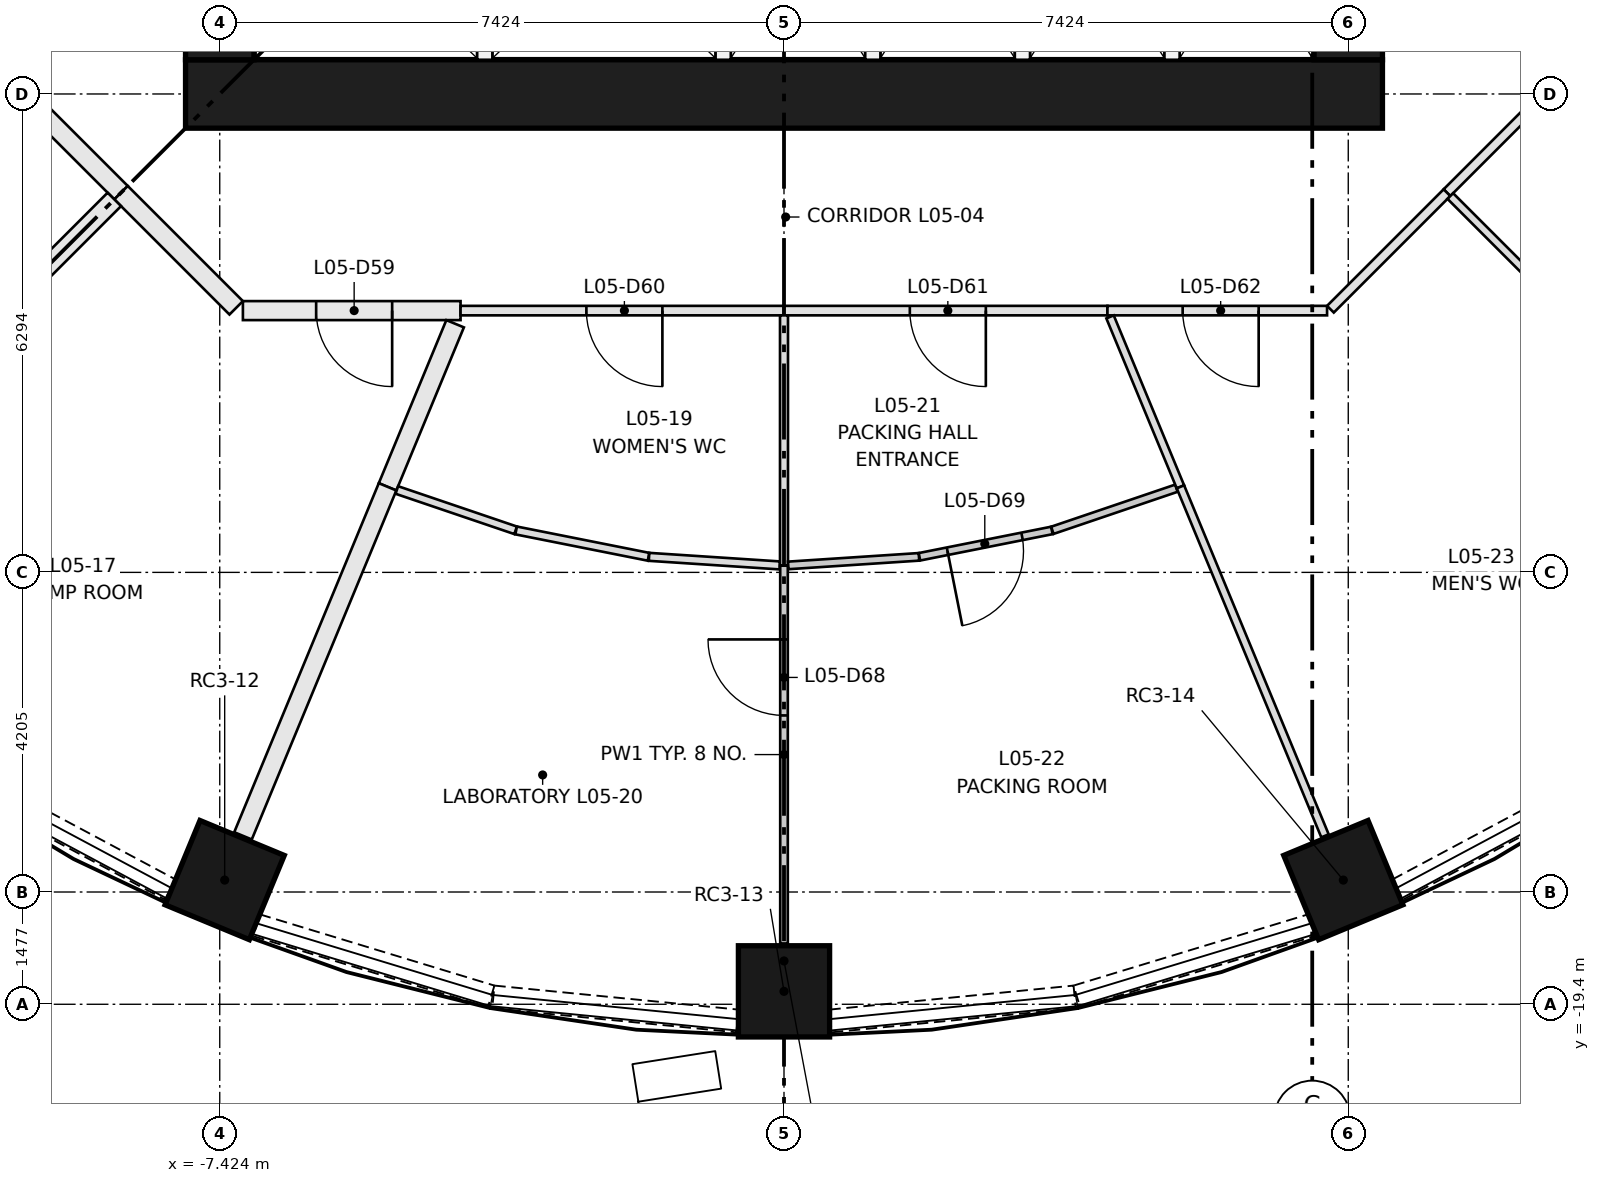
"""IFC4 building model, lengths in metres.
Left out: names, types, materials, properties, quantities, classifications, styles, units other than length and angle.
Written with IfcOpenShell. Run it as: python <this file> out.ifc"""

import sys

from ifc_helpers import new_model, si_unit, direction, frame, frame_2d, origin, origin_2d, place, context, subcontext, project, spatial, rectangle, extrude, element, fill, save


model = new_model("IFC4")
c1 = context("Model", 3, precision=1e-05, world=origin(), true_north=direction((0.0, 1.0)))
c2 = subcontext(c1, "Body", "Model", "MODEL_VIEW")
j1 = project(units=[si_unit("LENGTHUNIT", "METRE"), si_unit("PLANEANGLEUNIT", "RADIAN")], contexts=[c1])
p1 = place(None, origin())
s1 = spatial("IfcSite", under=j1, at=p1, CompositionType="ELEMENT")
p2 = place(p1, origin())
s2 = spatial("IfcBuilding", under=s1, at=p2, CompositionType="ELEMENT")
p3 = place(p2, frame((0.0, 0.0, 22.4)))
s3 = spatial("IfcBuildingStorey", under=s2, at=p3, CompositionType="ELEMENT", Elevation=22.4)
for number, where, z_axis, x_axis in (
    (1, (-7.359, -17.766, 0.0), (0.0, 0.0, 1.0), (-0.383, -0.924, 0.0)),
    (2, (0.0, -19.23, 0.0), (0.0, 0.0, 1.0), (0.0, -1.0, 0.0)),
    (3, (7.359, -17.766, 0.0), (0.0, 0.0, 1.0), (0.383, -0.924, 0.0)),
):
    element("IfcColumn", number, at=place(p3, frame(where, z_axis=z_axis, x_axis=x_axis)), inside=s3, PredefinedType="COLUMN", context=c2, shape_type="SweptSolid", body=[
        extrude(rectangle(XDim=1.2, YDim=1.2, at=origin_2d()), origin(), (0.0, 0.0, 1.0), 3.8),
    ])
p4 = place(p3, frame((-7.874, -7.424, 0.0), z_axis=(0.0, 0.0, 1.0), x_axis=(1.0, 0.0, 0.0)))
e4 = element("IfcWall", 4, at=p4, inside=s3, PredefinedType="SHEAR", context=c2, shape_type="SweptSolid", body=[
    extrude(rectangle(XDim=15.748, YDim=0.9, at=frame_2d((7.874, 0.0))), origin(), (0.0, 0.0, 1.0), 3.8),
])
p5 = place(p3, frame((-7.424, -6.974, 0.0), z_axis=(0.0, 0.0, 1.0), x_axis=(0.0, 1.0, 0.0)))
e5 = element("IfcWall", 5, at=p5, inside=s3, PredefinedType="SHEAR", context=c2, shape_type="SweptSolid", body=[
    extrude(rectangle(XDim=13.948, YDim=0.9, at=frame_2d((6.974, 0.0))), origin(), (0.0, 0.0, 1.0), 3.8),
])
p6 = place(p5, frame((6.474, 0.0, 0.0)))
e6 = element("IfcOpeningElement", 6, at=p6, cuts=e5, PredefinedType="OPENING", context=c2, shape_type="SweptSolid", body=[
    extrude(rectangle(XDim=1.0, YDim=2.1, at=frame_2d((0.5, 1.05))), frame((0.0, 0.46, 0.0), z_axis=(0.0, -1.0, 0.0), x_axis=(1.0, 0.0, 0.0)), (0.0, 0.0, 1.0), 0.92),
])
p7 = place(p5, frame((3.35, 0.0, 0.0)))
e7 = element("IfcOpeningElement", 7, at=p7, cuts=e5, PredefinedType="OPENING", context=c2, shape_type="SweptSolid", body=[
    extrude(rectangle(XDim=1.8, YDim=2.1, at=frame_2d((0.9, 1.05))), frame((0.0, 0.46, 0.0), z_axis=(0.0, -1.0, 0.0), x_axis=(1.0, 0.0, 0.0)), (0.0, 0.0, 1.0), 0.92),
])
p8 = place(p5, frame((8.799, 0.0, 0.0)))
e8 = element("IfcOpeningElement", 8, at=p8, cuts=e5, PredefinedType="OPENING", context=c2, shape_type="SweptSolid", body=[
    extrude(rectangle(XDim=1.8, YDim=2.1, at=frame_2d((0.9, 1.05))), frame((0.0, 0.46, 0.0), z_axis=(0.0, -1.0, 0.0), x_axis=(1.0, 0.0, 0.0)), (0.0, 0.0, 1.0), 0.92),
])
p9 = place(p5, frame((11.974, 0.0, 0.0)))
e9 = element("IfcOpeningElement", 9, at=p9, cuts=e5, PredefinedType="OPENING", context=c2, shape_type="SweptSolid", body=[
    extrude(rectangle(XDim=1.0, YDim=2.1, at=frame_2d((0.5, 1.05))), frame((0.0, 0.46, 0.0), z_axis=(0.0, -1.0, 0.0), x_axis=(1.0, 0.0, 0.0)), (0.0, 0.0, 1.0), 0.92),
])
p10 = place(p3, frame((7.424, -6.974, 0.0), z_axis=(0.0, 0.0, 1.0), x_axis=(0.0, 1.0, 0.0)))
e10 = element("IfcWall", 10, at=p10, inside=s3, PredefinedType="SHEAR", context=c2, shape_type="SweptSolid", body=[
    extrude(rectangle(XDim=13.948, YDim=0.9, at=frame_2d((6.974, 0.0))), origin(), (0.0, 0.0, 1.0), 3.8),
])
p11 = place(p10, frame((6.474, 0.0, 0.0)))
e11 = element("IfcOpeningElement", 11, at=p11, cuts=e10, PredefinedType="OPENING", context=c2, shape_type="SweptSolid", body=[
    extrude(rectangle(XDim=1.0, YDim=2.1, at=frame_2d((0.5, 1.05))), frame((0.0, 0.46, 0.0), z_axis=(0.0, -1.0, 0.0), x_axis=(1.0, 0.0, 0.0)), (0.0, 0.0, 1.0), 0.92),
])
p12 = place(p10, frame((3.35, 0.0, 0.0)))
e12 = element("IfcOpeningElement", 12, at=p12, cuts=e10, PredefinedType="OPENING", context=c2, shape_type="SweptSolid", body=[
    extrude(rectangle(XDim=1.8, YDim=2.1, at=frame_2d((0.9, 1.05))), frame((0.0, 0.46, 0.0), z_axis=(0.0, -1.0, 0.0), x_axis=(1.0, 0.0, 0.0)), (0.0, 0.0, 1.0), 0.92),
])
p13 = place(p10, frame((8.799, 0.0, 0.0)))
e13 = element("IfcOpeningElement", 13, at=p13, cuts=e10, PredefinedType="OPENING", context=c2, shape_type="SweptSolid", body=[
    extrude(rectangle(XDim=1.8, YDim=2.1, at=frame_2d((0.9, 1.05))), frame((0.0, 0.46, 0.0), z_axis=(0.0, -1.0, 0.0), x_axis=(1.0, 0.0, 0.0)), (0.0, 0.0, 1.0), 0.92),
])
for number, where, z_axis, x_axis in (
    (14, (-3.937, -6.974, 0.0), (0.0, 0.0, 1.0), (0.0, 1.0, 0.0)),
    (15, (-0.8, -6.974, 0.0), (0.0, 0.0, 1.0), (0.0, 1.0, 0.0)),
    (16, (1.168, -6.974, 0.0), (0.0, 0.0, 1.0), (0.0, 1.0, 0.0)),
    (17, (3.137, -6.974, 0.0), (0.0, 0.0, 1.0), (0.0, 1.0, 0.0)),
    (18, (5.105, -6.974, 0.0), (0.0, 0.0, 1.0), (0.0, 1.0, 0.0)),
):
    element("IfcWall", number, at=place(p3, frame(where, z_axis=z_axis, x_axis=x_axis)), inside=s3, PredefinedType="PARTITIONING", context=c2, shape_type="SweptSolid", body=[
        extrude(rectangle(XDim=2.8, YDim=0.2, at=frame_2d((1.4, 0.0))), origin(), (0.0, 0.0, 1.0), 3.45),
    ])
p14 = place(p3, frame((-10.92, -16.37, 0.0), z_axis=(0.0, 0.0, 1.0), x_axis=(0.881960953585, -0.471322475968, 0.0)))
e19 = element("IfcWall", 19, at=p14, inside=s3, PredefinedType="SOLIDWALL", context=c2, shape_type="SweptSolid", body=[
    extrude(rectangle(XDim=3.227, YDim=0.3, at=frame_2d((1.613, 0.0))), origin(), (0.0, 0.0, 1.0), 0.9),
])
p15 = place(p3, frame((-6.941, -18.36, 0.0), z_axis=(0.0, 0.0, 1.0), x_axis=(0.95687343998, -0.290505111592, 0.0)))
e20 = element("IfcWall", 20, at=p15, inside=s3, PredefinedType="SOLIDWALL", context=c2, shape_type="SweptSolid", body=[
    extrude(rectangle(XDim=3.226, YDim=0.3, at=frame_2d((1.613, 0.0))), origin(), (0.0, 0.0, 1.0), 0.9),
])
for number, where, z_axis, x_axis in (
    (21, (-3.824, -19.303, 0.0), (0.0, 0.0, 1.0), (0.995, -0.098, 0.0)),
    (22, (0.613, -19.619, 0.0), (0.0, 0.0, 1.0), (0.995, 0.098, 0.0)),
):
    element("IfcWall", number, at=place(p3, frame(where, z_axis=z_axis, x_axis=x_axis)), inside=s3, PredefinedType="SOLIDWALL", context=c2, shape_type="SweptSolid", body=[
        extrude(rectangle(XDim=3.227, YDim=0.3, at=frame_2d((1.613, 0.0))), origin(), (0.0, 0.0, 1.0), 0.9),
    ])
p16 = place(p3, frame((3.854, -19.298, 0.0), z_axis=(0.0, 0.0, 1.0), x_axis=(0.95687343998, 0.290505111592, 0.0)))
e23 = element("IfcWall", 23, at=p16, inside=s3, PredefinedType="SOLIDWALL", context=c2, shape_type="SweptSolid", body=[
    extrude(rectangle(XDim=3.226, YDim=0.3, at=frame_2d((1.613, 0.0))), origin(), (0.0, 0.0, 1.0), 0.9),
])
p17 = place(p3, frame((8.074, -17.891, 0.0), z_axis=(0.0, 0.0, 1.0), x_axis=(0.881960953585, 0.471322475968, 0.0)))
e24 = element("IfcWall", 24, at=p17, inside=s3, PredefinedType="SOLIDWALL", context=c2, shape_type="SweptSolid", body=[
    extrude(rectangle(XDim=3.227, YDim=0.3, at=frame_2d((1.613, 0.0))), origin(), (0.0, 0.0, 1.0), 0.9),
])
p18 = place(p3, frame((10.256, -7.189, 0.0), z_axis=(0.0, 0.0, 1.0), x_axis=(-0.707163081738, -0.707050476152, 0.0)))
e25 = element("IfcWall", 25, at=p18, inside=s3, PredefinedType="PARTITIONING", context=c2, shape_type="SweptSolid", body=[
    extrude(rectangle(XDim=2.168, YDim=0.125, at=frame_2d((1.084, 0.0))), origin(), (0.0, 0.0, 1.0), 3.45),
])
for number, where, z_axis, x_axis in (
    (26, (-8.722, -8.722, 0.0), (0.0, 0.0, 1.0), (-0.707, 0.707, 0.0)),
    (27, (-7.208, -10.237, 0.0), (0.0, 0.0, 1.0), (-0.707, 0.707, 0.0)),
):
    element("IfcWall", number, at=place(p3, frame(where, z_axis=z_axis, x_axis=x_axis)), inside=s3, PredefinedType="PARTITIONING", context=c2, shape_type="SweptSolid", body=[
        extrude(rectangle(XDim=2.142, YDim=0.25, at=frame_2d((1.071, 0.0))), origin(), (0.0, 0.0, 1.0), 3.45),
    ])
p19 = place(p3, frame((-4.256, -10.274, 0.0), z_axis=(0.0, 0.0, 1.0), x_axis=(-1.0, 0.0, 0.0)))
e28 = element("IfcWall", 28, at=p19, inside=s3, PredefinedType="PARTITIONING", context=c2, shape_type="SweptSolid", body=[
    extrude(rectangle(XDim=2.864, YDim=0.25, at=frame_2d((1.432, 0.0))), origin(), (0.0, 0.0, 1.0), 3.45),
])
p20 = place(p19, frame((0.9, 0.0, 0.0)))
e29 = element("IfcOpeningElement", 29, at=p20, cuts=e28, PredefinedType="OPENING", context=c2, shape_type="SweptSolid", body=[
    extrude(rectangle(XDim=1.0, YDim=2.1, at=frame_2d((0.5, 1.05))), frame((0.0, 0.135, 0.0), z_axis=(0.0, -1.0, 0.0), x_axis=(1.0, 0.0, 0.0)), (0.0, 0.0, 1.0), 0.27),
])
p21 = place(p3, frame((0.0, -10.274, 0.0), z_axis=(0.0, 0.0, 1.0), x_axis=(-1.0, 0.0, 0.0)))
e30 = element("IfcWall", 30, at=p21, inside=s3, PredefinedType="PARTITIONING", context=c2, shape_type="SweptSolid", body=[
    extrude(rectangle(XDim=4.256, YDim=0.125, at=frame_2d((2.128, 0.0))), origin(), (0.0, 0.0, 1.0), 3.45),
])
p22 = place(p21, frame((1.6, 0.0, 0.0)))
e31 = element("IfcOpeningElement", 31, at=p22, cuts=e30, PredefinedType="OPENING", context=c2, shape_type="SweptSolid", body=[
    extrude(rectangle(XDim=1.0, YDim=2.1, at=frame_2d((0.5, 1.05))), frame((0.0, 0.073, 0.0), z_axis=(0.0, -1.0, 0.0), x_axis=(1.0, 0.0, 0.0)), (0.0, 0.0, 1.0), 0.145),
])
p23 = place(p3, frame((4.256, -10.274, 0.0), z_axis=(0.0, 0.0, 1.0), x_axis=(-1.0, 0.0, 0.0)))
e32 = element("IfcWall", 32, at=p23, inside=s3, PredefinedType="PARTITIONING", context=c2, shape_type="SweptSolid", body=[
    extrude(rectangle(XDim=4.256, YDim=0.125, at=frame_2d((2.128, 0.0))), origin(), (0.0, 0.0, 1.0), 3.45),
])
p24 = place(p23, frame((1.6, 0.0, 0.0)))
e33 = element("IfcOpeningElement", 33, at=p24, cuts=e32, PredefinedType="OPENING", context=c2, shape_type="SweptSolid", body=[
    extrude(rectangle(XDim=1.0, YDim=2.1, at=frame_2d((0.5, 1.05))), frame((0.0, 0.073, 0.0), z_axis=(0.0, -1.0, 0.0), x_axis=(1.0, 0.0, 0.0)), (0.0, 0.0, 1.0), 0.145),
])
p25 = place(p3, frame((7.145, -10.274, 0.0), z_axis=(0.0, 0.0, 1.0), x_axis=(-1.0, 0.0, 0.0)))
e34 = element("IfcWall", 34, at=p25, inside=s3, PredefinedType="PARTITIONING", context=c2, shape_type="SweptSolid", body=[
    extrude(rectangle(XDim=2.89, YDim=0.125, at=frame_2d((1.445, 0.0))), origin(), (0.0, 0.0, 1.0), 3.45),
])
p26 = place(p25, frame((0.9, 0.0, 0.0)))
e35 = element("IfcOpeningElement", 35, at=p26, cuts=e34, PredefinedType="OPENING", context=c2, shape_type="SweptSolid", body=[
    extrude(rectangle(XDim=1.0, YDim=2.1, at=frame_2d((0.5, 1.05))), frame((0.0, 0.073, 0.0), z_axis=(0.0, -1.0, 0.0), x_axis=(1.0, 0.0, 0.0)), (0.0, 0.0, 1.0), 0.145),
])
p27 = place(p3, frame((8.722, -8.722, 0.0), z_axis=(0.0, 0.0, 1.0), x_axis=(-0.707050476152, -0.707163081738, 0.0)))
e36 = element("IfcWall", 36, at=p27, inside=s3, PredefinedType="PARTITIONING", context=c2, shape_type="SweptSolid", body=[
    extrude(rectangle(XDim=2.168, YDim=0.125, at=frame_2d((1.084, 0.0))), origin(), (0.0, 0.0, 1.0), 3.45),
])
p28 = place(p3, frame((-13.152, -13.152, 0.0), z_axis=(0.0, 0.0, 1.0), x_axis=(0.707106781187, 0.707106781187, 0.0)))
e37 = element("IfcWall", 37, at=p28, inside=s3, PredefinedType="PARTITIONING", context=c2, shape_type="SweptSolid", body=[
    extrude(rectangle(XDim=6.14, YDim=0.25, at=frame_2d((3.07, 0.0))), origin(), (0.0, 0.0, 1.0), 3.45),
])
p29 = place(p3, frame((-4.327, -10.447, 0.0), z_axis=(0.0, 0.0, 1.0), x_axis=(-0.382636505481, -0.923898968867, 0.0)))
e38 = element("IfcWall", 38, at=p29, inside=s3, PredefinedType="PARTITIONING", context=c2, shape_type="SweptSolid", body=[
    extrude(rectangle(XDim=2.323, YDim=0.25, at=frame_2d((1.161, 0.0))), origin(), (0.0, 0.0, 1.0), 3.45),
])
p30 = place(p3, frame((-5.216, -12.593, 0.0), z_axis=(0.0, 0.0, 1.0), x_axis=(-0.382720561955, -0.923864152058, 0.0)))
e39 = element("IfcWall", 39, at=p30, inside=s3, PredefinedType="PARTITIONING", context=c2, shape_type="SweptSolid", body=[
    extrude(rectangle(XDim=4.97, YDim=0.25, at=frame_2d((2.485, 0.0))), origin(), (0.0, 0.0, 1.0), 3.45),
])
p31 = place(p3, frame((-3.531, -13.165, 0.0), z_axis=(0.0, 0.0, 1.0), x_axis=(-0.946893484748, 0.321547397039, 0.0)))
e40 = element("IfcWall", 40, at=p31, inside=s3, PredefinedType="PARTITIONING", context=c2, shape_type="SweptSolid", body=[
    extrude(rectangle(XDim=1.651, YDim=0.105, at=frame_2d((0.825, 0.0))), origin(), (0.0, 0.0, 1.0), 3.45),
])
p32 = place(p3, frame((-1.782, -13.513, 0.0), z_axis=(0.0, 0.0, 1.0), x_axis=(-0.980791585618, 0.195058620882, 0.0)))
e41 = element("IfcWall", 41, at=p32, inside=s3, PredefinedType="PARTITIONING", context=c2, shape_type="SweptSolid", body=[
    extrude(rectangle(XDim=1.776, YDim=0.105, at=frame_2d((0.888, 0.0))), origin(), (0.0, 0.0, 1.0), 3.45),
])
p33 = place(p3, frame((-0.056, -13.626, 0.0), z_axis=(0.0, 0.0, 1.0), x_axis=(-0.997865280678, 0.065306061101, 0.0)))
e42 = element("IfcWall", 42, at=p33, inside=s3, PredefinedType="PARTITIONING", context=c2, shape_type="SweptSolid", body=[
    extrude(rectangle(XDim=1.723, YDim=0.105, at=frame_2d((0.862, 0.0))), origin(), (0.0, 0.0, 1.0), 3.45),
])
p34 = place(p3, frame((0.0, -10.336, 0.0), z_axis=(0.0, 0.0, 1.0), x_axis=(0.0, -1.0, 0.0)))
e43 = element("IfcWall", 43, at=p34, inside=s3, PredefinedType="PARTITIONING", context=c2, shape_type="SweptSolid", body=[
    extrude(rectangle(XDim=3.293, YDim=0.105, at=frame_2d((1.647, 0.0))), origin(), (0.0, 0.0, 1.0), 3.45),
])
p35 = place(p3, frame((0.0, -18.6, 0.0), z_axis=(0.0, 0.0, 1.0), x_axis=(0.0, 1.0, 0.0)))
e44 = element("IfcWall", 44, at=p35, inside=s3, PredefinedType="PARTITIONING", context=c2, shape_type="SweptSolid", body=[
    extrude(rectangle(XDim=4.97, YDim=0.1, at=frame_2d((2.485, 0.0))), origin(), (0.0, 0.0, 1.0), 3.45),
])
p36 = place(p35, frame((3.0, 0.0, 0.0)))
e45 = element("IfcOpeningElement", 45, at=p36, cuts=e44, PredefinedType="OPENING", context=c2, shape_type="SweptSolid", body=[
    extrude(rectangle(XDim=1.0, YDim=2.1, at=frame_2d((0.5, 1.05))), frame((0.0, 0.06, 0.0), z_axis=(0.0, -1.0, 0.0), x_axis=(1.0, 0.0, 0.0)), (0.0, 0.0, 1.0), 0.12),
])
p37 = place(p3, frame((1.776, -13.514, 0.0), z_axis=(0.0, 0.0, 1.0), x_axis=(-0.997865884721, -0.065296830782, 0.0)))
e46 = element("IfcWall", 46, at=p37, inside=s3, PredefinedType="PARTITIONING", context=c2, shape_type="SweptSolid", body=[
    extrude(rectangle(XDim=1.724, YDim=0.1, at=frame_2d((0.862, 0.0))), origin(), (0.0, 0.0, 1.0), 3.45),
])
p38 = place(p3, frame((3.524, -13.166, 0.0), z_axis=(0.0, 0.0, 1.0), x_axis=(-0.980796814698, -0.195032326241, 0.0)))
e47 = element("IfcWall", 47, at=p38, inside=s3, PredefinedType="PARTITIONING", context=c2, shape_type="SweptSolid", body=[
    extrude(rectangle(XDim=1.776, YDim=0.1, at=frame_2d((0.888, 0.0))), origin(), (0.0, 0.0, 1.0), 3.45),
])
p39 = place(p38, frame((0.4, 0.0, 0.0)))
e48 = element("IfcOpeningElement", 48, at=p39, cuts=e47, PredefinedType="OPENING", context=c2, shape_type="SweptSolid", body=[
    extrude(rectangle(XDim=1.0, YDim=2.1, at=frame_2d((0.5, 1.05))), frame((0.0, 0.06, 0.0), z_axis=(0.0, -1.0, 0.0), x_axis=(1.0, 0.0, 0.0)), (0.0, 0.0, 1.0), 0.12),
])
p40 = place(p3, frame((5.163, -12.611, 0.0), z_axis=(0.0, 0.0, 1.0), x_axis=(-0.946955612201, -0.321364385894, 0.0)))
e49 = element("IfcWall", 49, at=p40, inside=s3, PredefinedType="PARTITIONING", context=c2, shape_type="SweptSolid", body=[
    extrude(rectangle(XDim=1.724, YDim=0.1, at=frame_2d((0.862, 0.0))), origin(), (0.0, 0.0, 1.0), 3.45),
])
p41 = place(p3, frame((4.29, -10.357, 0.0), z_axis=(0.0, 0.0, 1.0), x_axis=(0.382651760667, -0.923892650722, 0.0)))
e50 = element("IfcWall", 50, at=p41, inside=s3, PredefinedType="PARTITIONING", context=c2, shape_type="SweptSolid", body=[
    extrude(rectangle(XDim=2.42, YDim=0.105, at=frame_2d((1.21, 0.0))), origin(), (0.0, 0.0, 1.0), 3.45),
])
p42 = place(p3, frame((5.216, -12.593, 0.0), z_axis=(0.0, 0.0, 1.0), x_axis=(0.382678632707, -0.92388152058, 0.0)))
e51 = element("IfcWall", 51, at=p42, inside=s3, PredefinedType="PARTITIONING", context=c2, shape_type="SweptSolid", body=[
    extrude(rectangle(XDim=4.97, YDim=0.105, at=frame_2d((2.485, 0.0))), origin(), (0.0, 0.0, 1.0), 3.45),
])
p43 = place(p3, frame((8.767, -8.767, 0.0), z_axis=(0.0, 0.0, 1.0), x_axis=(0.707106781187, -0.707106781187, 0.0)))
e52 = element("IfcWall", 52, at=p43, inside=s3, PredefinedType="PARTITIONING", context=c2, shape_type="SweptSolid", body=[
    extrude(rectangle(XDim=6.202, YDim=0.105, at=frame_2d((3.101, 0.0))), origin(), (0.0, 0.0, 1.0), 3.45),
])
p44 = place(p20, origin())
e53 = element("IfcDoor", 53, at=p44, inside=s3, OperationType="SINGLE_SWING_LEFT", PredefinedType="DOOR", context=c2, shape_type="SweptSolid", body=[
    extrude(rectangle(XDim=1.0, YDim=2.1, at=frame_2d((0.5, 1.05))), frame((0.0, 0.025, 0.0), z_axis=(0.0, -1.0, 0.0), x_axis=(1.0, 0.0, 0.0)), (0.0, 0.0, 1.0), 0.05),
])
fill(e29, e53)
p45 = place(p22, origin())
e54 = element("IfcDoor", 54, at=p45, inside=s3, OperationType="SINGLE_SWING_LEFT", PredefinedType="DOOR", context=c2, shape_type="SweptSolid", body=[
    extrude(rectangle(XDim=1.0, YDim=2.1, at=frame_2d((0.5, 1.05))), frame((0.0, 0.025, 0.0), z_axis=(0.0, -1.0, 0.0), x_axis=(1.0, 0.0, 0.0)), (0.0, 0.0, 1.0), 0.05),
])
fill(e31, e54)
p46 = place(p24, origin())
e55 = element("IfcDoor", 55, at=p46, inside=s3, OperationType="SINGLE_SWING_LEFT", PredefinedType="DOOR", context=c2, shape_type="SweptSolid", body=[
    extrude(rectangle(XDim=1.0, YDim=2.1, at=frame_2d((0.5, 1.05))), frame((0.0, 0.025, 0.0), z_axis=(0.0, -1.0, 0.0), x_axis=(1.0, 0.0, 0.0)), (0.0, 0.0, 1.0), 0.05),
])
fill(e33, e55)
p47 = place(p26, origin())
e56 = element("IfcDoor", 56, at=p47, inside=s3, OperationType="SINGLE_SWING_LEFT", PredefinedType="DOOR", context=c2, shape_type="SweptSolid", body=[
    extrude(rectangle(XDim=1.0, YDim=2.1, at=frame_2d((0.5, 1.05))), frame((0.0, 0.025, 0.0), z_axis=(0.0, -1.0, 0.0), x_axis=(1.0, 0.0, 0.0)), (0.0, 0.0, 1.0), 0.05),
])
fill(e35, e56)
p48 = place(p36, origin())
e57 = element("IfcDoor", 57, at=p48, inside=s3, OperationType="SINGLE_SWING_RIGHT", PredefinedType="DOOR", context=c2, shape_type="SweptSolid", body=[
    extrude(rectangle(XDim=1.0, YDim=2.1, at=frame_2d((0.5, 1.05))), frame((0.0, 0.025, 0.0), z_axis=(0.0, -1.0, 0.0), x_axis=(1.0, 0.0, 0.0)), (0.0, 0.0, 1.0), 0.05),
])
fill(e45, e57)
p49 = place(p39, origin())
e58 = element("IfcDoor", 58, at=p49, inside=s3, OperationType="SINGLE_SWING_RIGHT", PredefinedType="DOOR", context=c2, shape_type="SweptSolid", body=[
    extrude(rectangle(XDim=1.0, YDim=2.1, at=frame_2d((0.5, 1.05))), frame((0.0, 0.025, 0.0), z_axis=(0.0, -1.0, 0.0), x_axis=(1.0, 0.0, 0.0)), (0.0, 0.0, 1.0), 0.05),
])
fill(e48, e58)
save(model, sys.argv[1])
